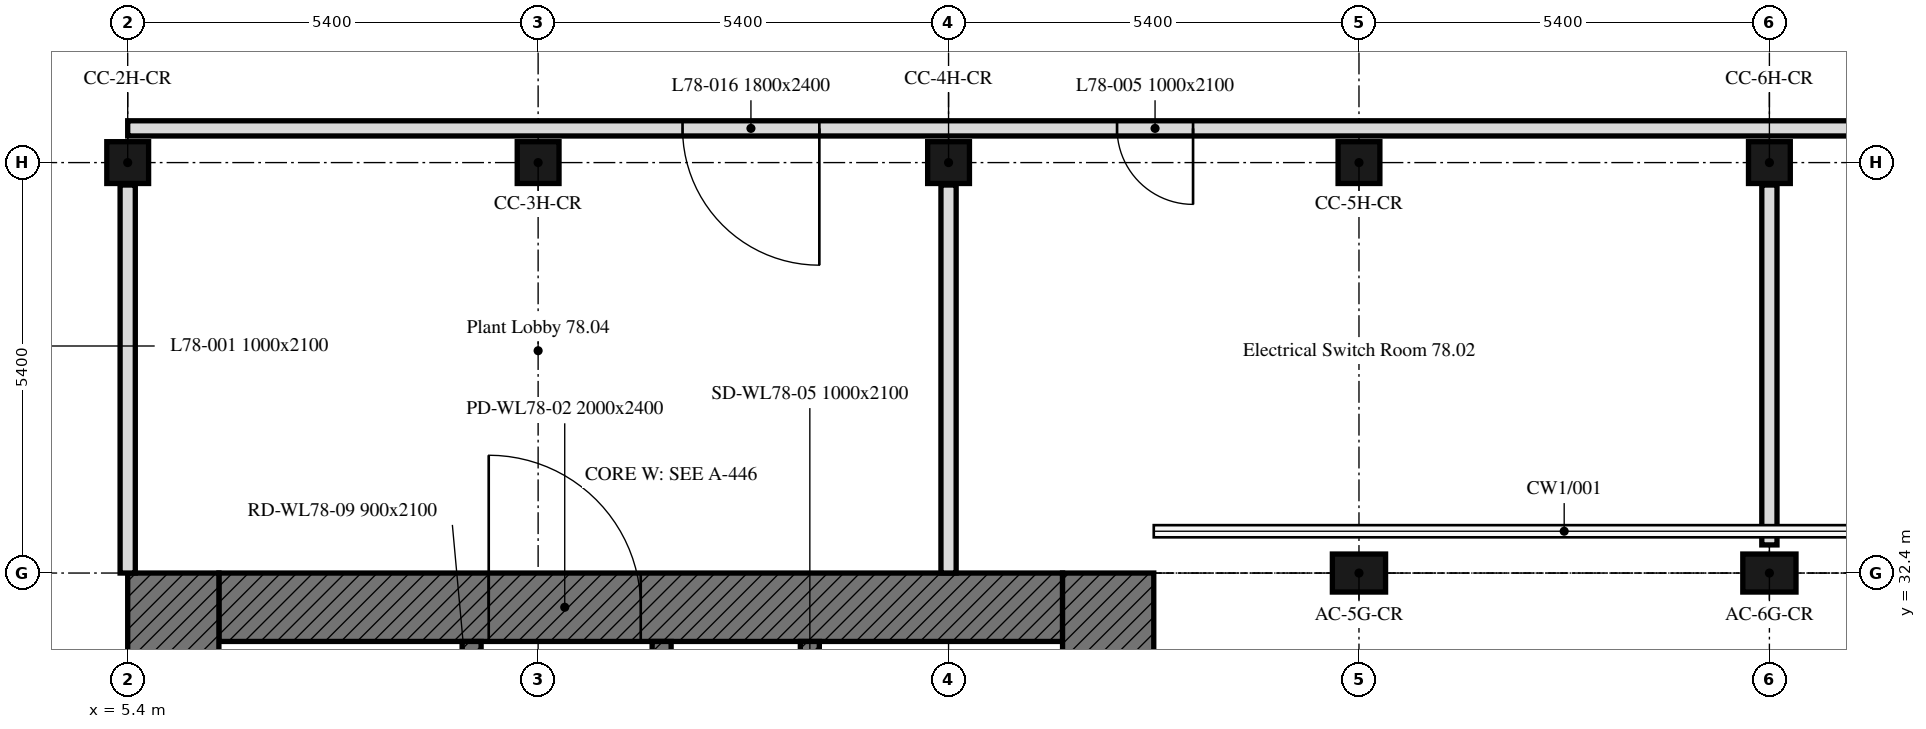
"""IFC4 building model, lengths in metres.
Left out: names, types, materials, properties, quantities, classifications, styles, units other than length and angle.
Written with IfcOpenShell. Run it as: python <this file> out.ifc"""

import sys

from ifc_helpers import new_model, si_unit, direction, frame, frame_2d, origin, origin_2d, place, context, subcontext, project, spatial, rectangle, extrude, element, fill, save


model = new_model("IFC4")
c1 = context("Model", 3, precision=1e-05, world=origin(), true_north=direction((0.0, 1.0)))
c2 = subcontext(c1, "Body", "Model", "MODEL_VIEW")
j1 = project(units=[si_unit("LENGTHUNIT", "METRE"), si_unit("PLANEANGLEUNIT", "RADIAN")], contexts=[c1])
p1 = place(None, origin())
s1 = spatial("IfcSite", under=j1, at=p1, CompositionType="ELEMENT")
p2 = place(p1, origin())
s2 = spatial("IfcBuilding", under=s1, at=p2, CompositionType="ELEMENT")
p3 = place(p2, frame((0.0, 0.0, 312.7)))
s3 = spatial("IfcBuildingStorey", under=s2, at=p3, CompositionType="ELEMENT", Elevation=312.7)
for number, where, z_axis, x_axis in (
    (1, (21.6, 32.4, 0.0), (0.0, 0.0, 1.0), (1.0, 0.0, 0.0)),
    (2, (27.0, 32.4, 0.0), (0.0, 0.0, 1.0), (1.0, 0.0, 0.0)),
):
    element("IfcColumn", number, at=place(p3, frame(where, z_axis=z_axis, x_axis=x_axis)), inside=s3, PredefinedType="COLUMN", context=c2, shape_type="SweptSolid", body=[
        extrude(rectangle(XDim=0.7, YDim=0.5, at=origin_2d()), origin(), (0.0, 0.0, 1.0), 4.2),
    ])
for number, where, z_axis, x_axis in (
    (3, (5.4, 37.8, 0.0), (0.0, 0.0, 1.0), (1.0, 0.0, 0.0)),
    (4, (10.8, 37.8, 0.0), (0.0, 0.0, 1.0), (1.0, 0.0, 0.0)),
    (5, (16.2, 37.8, 0.0), (0.0, 0.0, 1.0), (1.0, 0.0, 0.0)),
    (6, (21.6, 37.8, 0.0), (0.0, 0.0, 1.0), (1.0, 0.0, 0.0)),
    (7, (27.0, 37.8, 0.0), (0.0, 0.0, 1.0), (1.0, 0.0, 0.0)),
):
    element("IfcColumn", number, at=place(p3, frame(where, z_axis=z_axis, x_axis=x_axis)), inside=s3, PredefinedType="COLUMN", context=c2, shape_type="SweptSolid", body=[
        extrude(rectangle(XDim=0.55, YDim=0.55, at=origin_2d()), origin(), (0.0, 0.0, 1.0), 4.2),
    ])
p4 = place(p3, frame((6.6, 31.95, 0.0), z_axis=(0.0, 0.0, 1.0), x_axis=(1.0, 0.0, 0.0)))
e8 = element("IfcWall", 8, at=p4, inside=s3, PredefinedType="SOLIDWALL", context=c2, shape_type="SweptSolid", body=[
    extrude(rectangle(XDim=11.1, YDim=0.9, at=frame_2d((5.55, 0.0))), origin(), (0.0, 0.0, 1.0), 4.2),
])
p5 = place(p4, frame((3.55, 0.0, 0.0)))
e9 = element("IfcOpeningElement", 9, at=p5, cuts=e8, PredefinedType="OPENING", context=c2, shape_type="SweptSolid", body=[
    extrude(rectangle(XDim=2.0, YDim=2.4, at=frame_2d((1.0, 1.2))), frame((0.0, 0.45, 0.0), z_axis=(0.0, -1.0, 0.0), x_axis=(1.0, 0.0, 0.0)), (0.0, 0.0, 1.0), 0.9),
])
for number, where, z_axis, x_axis in (
    (10, (6.0, 16.2, 0.0), (0.0, 0.0, 1.0), (0.0, 1.0, 0.0)),
    (11, (18.3, 32.4, 0.0), (0.0, 0.0, 1.0), (0.0, -1.0, 0.0)),
):
    element("IfcWall", number, at=place(p3, frame(where, z_axis=z_axis, x_axis=x_axis)), inside=s3, PredefinedType="SOLIDWALL", context=c2, shape_type="SweptSolid", body=[
        extrude(rectangle(XDim=16.2, YDim=1.2, at=frame_2d((8.1, 0.0))), origin(), (0.0, 0.0, 1.0), 4.2),
    ])
p6 = place(p3, frame((9.925, 17.1, 0.0), z_axis=(0.0, 0.0, 1.0), x_axis=(0.0, 1.0, 0.0)))
e12 = element("IfcWall", 12, at=p6, inside=s3, PredefinedType="SOLIDWALL", context=c2, shape_type="SweptSolid", body=[
    extrude(rectangle(XDim=14.4, YDim=0.25, at=frame_2d((7.2, 0.0))), origin(), (0.0, 0.0, 1.0), 4.2),
])
p7 = place(p6, frame((4.6, 0.0, 0.0)))
e13 = element("IfcOpeningElement", 13, at=p7, cuts=e12, PredefinedType="OPENING", context=c2, shape_type="SweptSolid", body=[
    extrude(rectangle(XDim=1.0, YDim=2.1, at=frame_2d((0.5, 1.05))), frame((0.0, 0.125, 0.0), z_axis=(0.0, -1.0, 0.0), x_axis=(1.0, 0.0, 0.0)), (0.0, 0.0, 1.0), 0.25),
])
p8 = place(p6, frame((7.062, 0.0, 0.0)))
e14 = element("IfcOpeningElement", 14, at=p8, cuts=e12, PredefinedType="OPENING", context=c2, shape_type="SweptSolid", body=[
    extrude(rectangle(XDim=1.2, YDim=2.1, at=frame_2d((0.6, 1.05))), frame((0.0, 0.125, 0.0), z_axis=(0.0, -1.0, 0.0), x_axis=(1.0, 0.0, 0.0)), (0.0, 0.0, 1.0), 0.25),
])
p9 = place(p6, frame((10.106, 0.0, 0.0)))
e15 = element("IfcOpeningElement", 15, at=p9, cuts=e12, PredefinedType="OPENING", context=c2, shape_type="SweptSolid", body=[
    extrude(rectangle(XDim=0.9, YDim=2.1, at=frame_2d((0.45, 1.05))), frame((0.0, 0.125, 0.0), z_axis=(0.0, -1.0, 0.0), x_axis=(1.0, 0.0, 0.0)), (0.0, 0.0, 1.0), 0.25),
])
p10 = place(p6, frame((12.719, 0.0, 0.0)))
e16 = element("IfcOpeningElement", 16, at=p10, cuts=e12, PredefinedType="OPENING", context=c2, shape_type="SweptSolid", body=[
    extrude(rectangle(XDim=0.9, YDim=2.1, at=frame_2d((0.45, 1.05))), frame((0.0, 0.125, 0.0), z_axis=(0.0, -1.0, 0.0), x_axis=(1.0, 0.0, 0.0)), (0.0, 0.0, 1.0), 0.25),
])
p11 = place(p3, frame((14.375, 17.1, 0.0), z_axis=(0.0, 0.0, 1.0), x_axis=(0.0, 1.0, 0.0)))
e17 = element("IfcWall", 17, at=p11, inside=s3, PredefinedType="SOLIDWALL", context=c2, shape_type="SweptSolid", body=[
    extrude(rectangle(XDim=14.4, YDim=0.25, at=frame_2d((7.2, 0.0))), origin(), (0.0, 0.0, 1.0), 4.2),
])
p12 = place(p11, frame((13.15, 0.0, 0.0)))
e18 = element("IfcOpeningElement", 18, at=p12, cuts=e17, PredefinedType="OPENING", context=c2, shape_type="SweptSolid", body=[
    extrude(rectangle(XDim=1.0, YDim=2.1, at=frame_2d((0.5, 1.05))), frame((0.0, 0.125, 0.0), z_axis=(0.0, -1.0, 0.0), x_axis=(1.0, 0.0, 0.0)), (0.0, 0.0, 1.0), 0.25),
])
p13 = place(p11, frame((0.968, 0.0, 0.0)))
e19 = element("IfcOpeningElement", 19, at=p13, cuts=e17, PredefinedType="OPENING", context=c2, shape_type="SweptSolid", body=[
    extrude(rectangle(XDim=0.9, YDim=2.1, at=frame_2d((0.45, 1.05))), frame((0.0, 0.125, 0.0), z_axis=(0.0, -1.0, 0.0), x_axis=(1.0, 0.0, 0.0)), (0.0, 0.0, 1.0), 0.25),
])
p14 = place(p11, frame((3.468, 0.0, 0.0)))
e20 = element("IfcOpeningElement", 20, at=p14, cuts=e17, PredefinedType="OPENING", context=c2, shape_type="SweptSolid", body=[
    extrude(rectangle(XDim=0.9, YDim=2.1, at=frame_2d((0.45, 1.05))), frame((0.0, 0.125, 0.0), z_axis=(0.0, -1.0, 0.0), x_axis=(1.0, 0.0, 0.0)), (0.0, 0.0, 1.0), 0.25),
])
p15 = place(p11, frame((6.175, 0.0, 0.0)))
e21 = element("IfcOpeningElement", 21, at=p15, cuts=e17, PredefinedType="OPENING", context=c2, shape_type="SweptSolid", body=[
    extrude(rectangle(XDim=0.9, YDim=2.1, at=frame_2d((0.45, 1.05))), frame((0.0, 0.125, 0.0), z_axis=(0.0, -1.0, 0.0), x_axis=(1.0, 0.0, 0.0)), (0.0, 0.0, 1.0), 0.25),
])
p16 = place(p3, frame((12.425, 29.4, 0.0), z_axis=(0.0, 0.0, 1.0), x_axis=(0.0, 1.0, 0.0)))
e22 = element("IfcWall", 22, at=p16, inside=s3, PredefinedType="SOLIDWALL", context=c2, shape_type="SweptSolid", body=[
    extrude(rectangle(XDim=2.1, YDim=0.25, at=frame_2d((1.05, 0.0))), origin(), (0.0, 0.0, 1.0), 4.2),
])
p17 = place(p16, frame((0.5, 0.0, 0.0)))
e23 = element("IfcOpeningElement", 23, at=p17, cuts=e22, PredefinedType="OPENING", context=c2, shape_type="SweptSolid", body=[
    extrude(rectangle(XDim=1.0, YDim=2.1, at=frame_2d((0.5, 1.05))), frame((0.0, 0.125, 0.0), z_axis=(0.0, -1.0, 0.0), x_axis=(1.0, 0.0, 0.0)), (0.0, 0.0, 1.0), 0.25),
])
p18 = place(p3, frame((27.0, 37.505, 0.0), z_axis=(0.0, 0.0, 1.0), x_axis=(0.0, -1.0, 0.0)))
e24 = element("IfcWall", 24, at=p18, inside=s3, PredefinedType="PARTITIONING", context=c2, shape_type="SweptSolid", body=[
    extrude(rectangle(XDim=4.735, YDim=0.2, at=frame_2d((2.367, 0.0))), origin(), (0.0, 0.0, 1.0), 3.45),
])
p19 = place(p3, frame((16.2, 37.505, 0.0), z_axis=(0.0, 0.0, 1.0), x_axis=(0.0, -1.0, 0.0)))
e25 = element("IfcWall", 25, at=p19, inside=s3, PredefinedType="PARTITIONING", context=c2, shape_type="SweptSolid", body=[
    extrude(rectangle(XDim=5.105, YDim=0.2, at=frame_2d((2.552, 0.0))), origin(), (0.0, 0.0, 1.0), 3.45),
])
p20 = place(p3, frame((42.449, 38.25, 0.0), z_axis=(0.0, 0.0, 1.0), x_axis=(-1.0, 0.0, 0.0)))
e26 = element("IfcWall", 26, at=p20, inside=s3, PredefinedType="PARTITIONING", context=c2, shape_type="SweptSolid", body=[
    extrude(rectangle(XDim=37.049, YDim=0.2, at=frame_2d((18.524, 0.0))), origin(), (0.0, 0.0, 1.0), 3.45),
])
p21 = place(p20, frame((12.249, 0.0, 0.0)))
e27 = element("IfcOpeningElement", 27, at=p21, cuts=e26, PredefinedType="OPENING", context=c2, shape_type="SweptSolid", body=[
    extrude(rectangle(XDim=1.0, YDim=2.1, at=frame_2d((0.5, 1.05))), frame((0.0, 0.1, 0.0), z_axis=(0.0, -1.0, 0.0), x_axis=(1.0, 0.0, 0.0)), (0.0, 0.0, 1.0), 0.2),
])
p22 = place(p20, frame((23.032, 0.0, 0.0)))
e28 = element("IfcOpeningElement", 28, at=p22, cuts=e26, PredefinedType="OPENING", context=c2, shape_type="SweptSolid", body=[
    extrude(rectangle(XDim=1.0, YDim=2.1, at=frame_2d((0.5, 1.05))), frame((0.0, 0.1, 0.0), z_axis=(0.0, -1.0, 0.0), x_axis=(1.0, 0.0, 0.0)), (0.0, 0.0, 1.0), 0.2),
])
p23 = place(p20, frame((0.949, 0.0, 0.0)))
e29 = element("IfcOpeningElement", 29, at=p23, cuts=e26, PredefinedType="OPENING", context=c2, shape_type="SweptSolid", body=[
    extrude(rectangle(XDim=1.8, YDim=2.4, at=frame_2d((0.9, 1.2))), frame((0.0, 0.1, 0.0), z_axis=(0.0, -1.0, 0.0), x_axis=(1.0, 0.0, 0.0)), (0.0, 0.0, 1.0), 0.2),
])
p24 = place(p20, frame((27.949, 0.0, 0.0)))
e30 = element("IfcOpeningElement", 30, at=p24, cuts=e26, PredefinedType="OPENING", context=c2, shape_type="SweptSolid", body=[
    extrude(rectangle(XDim=1.8, YDim=2.4, at=frame_2d((0.9, 1.2))), frame((0.0, 0.1, 0.0), z_axis=(0.0, -1.0, 0.0), x_axis=(1.0, 0.0, 0.0)), (0.0, 0.0, 1.0), 0.2),
])
p25 = place(p3, frame((5.4, 37.505, 0.0), z_axis=(0.0, 0.0, 1.0), x_axis=(0.0, -1.0, 0.0)))
e31 = element("IfcWall", 31, at=p25, inside=s3, PredefinedType="PARTITIONING", context=c2, shape_type="SweptSolid", body=[
    extrude(rectangle(XDim=5.105, YDim=0.2, at=frame_2d((2.552, 0.0))), origin(), (0.0, 0.0, 1.0), 4.2),
])
p26 = place(p5, origin())
e32 = element("IfcDoor", 32, at=p26, inside=s3, OperationType="DOUBLE_DOOR_SINGLE_SWING", PredefinedType="DOOR", context=c2, shape_type="SweptSolid", body=[
    extrude(rectangle(XDim=2.0, YDim=2.4, at=frame_2d((1.0, 1.2))), frame((0.0, 0.025, 0.0), z_axis=(0.0, -1.0, 0.0), x_axis=(1.0, 0.0, 0.0)), (0.0, 0.0, 1.0), 0.05),
])
fill(e9, e32)
p27 = place(p22, origin())
e33 = element("IfcDoor", 33, at=p27, inside=s3, OperationType="SINGLE_SWING_RIGHT", PredefinedType="DOOR", context=c2, shape_type="SweptSolid", body=[
    extrude(rectangle(XDim=1.0, YDim=2.1, at=frame_2d((0.5, 1.05))), frame((0.0, 0.025, 0.0), z_axis=(0.0, -1.0, 0.0), x_axis=(1.0, 0.0, 0.0)), (0.0, 0.0, 1.0), 0.05),
])
fill(e28, e33)
p28 = place(p24, origin())
e34 = element("IfcDoor", 34, at=p28, inside=s3, OperationType="DOUBLE_DOOR_SINGLE_SWING", PredefinedType="DOOR", context=c2, shape_type="SweptSolid", body=[
    extrude(rectangle(XDim=1.8, YDim=2.4, at=frame_2d((0.9, 1.2))), frame((0.0, 0.025, 0.0), z_axis=(0.0, -1.0, 0.0), x_axis=(1.0, 0.0, 0.0)), (0.0, 0.0, 1.0), 0.05),
])
fill(e30, e34)
save(model, sys.argv[1])
